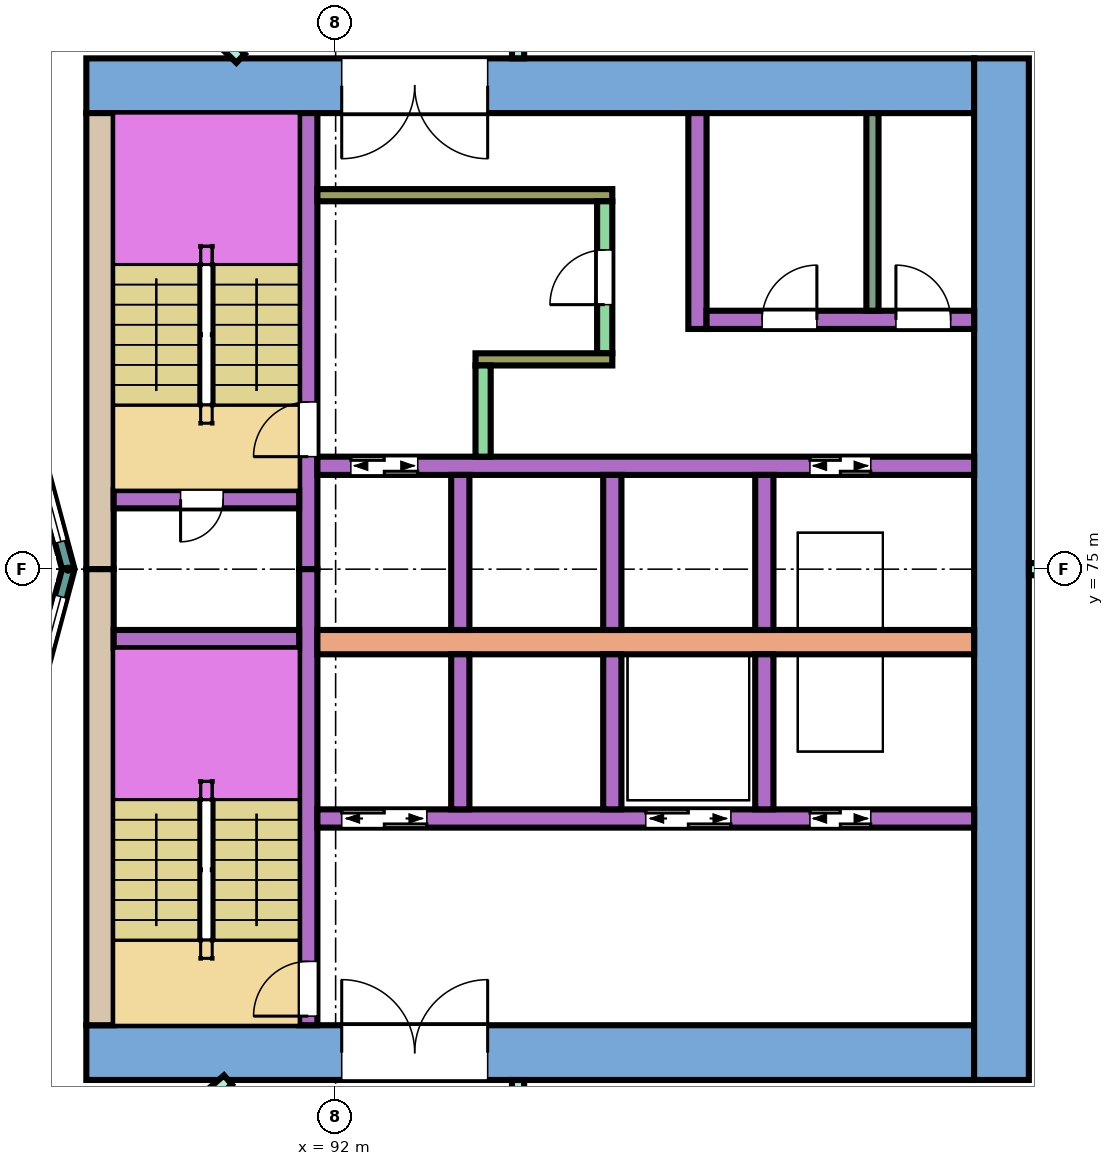
"""IFC4 building model, lengths in metres.
Left out: names, types, materials, properties, quantities, classifications, styles, units other than length and angle.
Written with IfcOpenShell. Run it as: python <this file> out.ifc"""

import sys

from ifc_helpers import new_model, si_unit, direction, frame, frame_2d, origin, place, context, subcontext, project, spatial, rectangle, extrude, element, fill, save


model = new_model("IFC4")
c1 = context("Model", 3, precision=1e-05, world=origin(), true_north=direction((0.0, 1.0)))
c2 = subcontext(c1, "Body", "Model", "MODEL_VIEW")
j1 = project(units=[si_unit("LENGTHUNIT", "METRE"), si_unit("PLANEANGLEUNIT", "RADIAN")], contexts=[c1])
p1 = place(None, origin())
s1 = spatial("IfcSite", under=j1, at=p1, CompositionType="ELEMENT")
p2 = place(p1, origin())
s2 = spatial("IfcBuilding", under=s1, at=p2, CompositionType="ELEMENT")
p3 = place(p2, frame((0.0, 0.0, 23.8)))
s3 = spatial("IfcBuildingStorey", under=s2, at=p3, CompositionType="ELEMENT", Elevation=23.8)
p4 = place(p3, frame((87.9, 82.95, 0.0), z_axis=(0.0, 0.0, 1.0), x_axis=(1.0, 0.0, 0.0)))
e1 = element("IfcWall", 1, at=p4, inside=s3, PredefinedType="SHEAR", context=c2, shape_type="SweptSolid", body=[
    extrude(rectangle(XDim=14.6, YDim=0.9, at=frame_2d((7.3, 0.0))), origin(), (0.0, 0.0, 1.0), 4.68),
])
p5 = place(p4, frame((4.2, 0.0, 0.0)))
e2 = element("IfcOpeningElement", 2, at=p5, cuts=e1, PredefinedType="OPENING", context=c2, shape_type="SweptSolid", body=[
    extrude(rectangle(XDim=2.4, YDim=2.4, at=frame_2d((1.2, 1.2))), frame((0.0, 0.46, 0.0), z_axis=(0.0, -1.0, 0.0), x_axis=(1.0, 0.0, 0.0)), (0.0, 0.0, 1.0), 0.92),
])
p6 = place(p3, frame((87.9, 67.05, 0.0), z_axis=(0.0, 0.0, 1.0), x_axis=(1.0, 0.0, 0.0)))
e3 = element("IfcWall", 3, at=p6, inside=s3, PredefinedType="SHEAR", context=c2, shape_type="SweptSolid", body=[
    extrude(rectangle(XDim=14.6, YDim=0.9, at=frame_2d((7.3, 0.0))), origin(), (0.0, 0.0, 1.0), 4.68),
])
p7 = place(p6, frame((4.2, 0.0, 0.0)))
e4 = element("IfcOpeningElement", 4, at=p7, cuts=e3, PredefinedType="OPENING", context=c2, shape_type="SweptSolid", body=[
    extrude(rectangle(XDim=2.4, YDim=2.4, at=frame_2d((1.2, 1.2))), frame((0.0, 0.46, 0.0), z_axis=(0.0, -1.0, 0.0), x_axis=(1.0, 0.0, 0.0)), (0.0, 0.0, 1.0), 0.92),
])
for number, where, z_axis, x_axis in (
    (5, (88.125, 75.0, 0.0), (0.0, 0.0, 1.0), (0.0, 1.0, 0.0)),
    (6, (88.125, 67.5, 0.0), (0.0, 0.0, 1.0), (0.0, 1.0, 0.0)),
):
    element("IfcWall", number, at=place(p3, frame(where, z_axis=z_axis, x_axis=x_axis)), inside=s3, PredefinedType="SHEAR", context=c2, shape_type="SweptSolid", body=[
        extrude(rectangle(XDim=7.5, YDim=0.45, at=frame_2d((3.75, 0.0))), origin(), (0.0, 0.0, 1.0), 4.68),
    ])
p8 = place(p3, frame((102.95, 66.6, 0.0), z_axis=(0.0, 0.0, 1.0), x_axis=(0.0, 1.0, 0.0)))
e7 = element("IfcWall", 7, at=p8, inside=s3, PredefinedType="SHEAR", context=c2, shape_type="SweptSolid", body=[
    extrude(rectangle(XDim=16.8, YDim=0.9, at=frame_2d((8.4, 0.0))), origin(), (0.0, 0.0, 1.0), 4.68),
])
p9 = place(p3, frame((91.55, 75.0, 0.0), z_axis=(0.0, 0.0, 1.0), x_axis=(0.0, 1.0, 0.0)))
e8 = element("IfcWall", 8, at=p9, inside=s3, PredefinedType="SHEAR", context=c2, shape_type="SweptSolid", body=[
    extrude(rectangle(XDim=7.5, YDim=0.3, at=frame_2d((3.75, 0.0))), origin(), (0.0, 0.0, 1.0), 4.68),
])
p10 = place(p9, frame((1.85, 0.0, 0.0)))
e9 = element("IfcOpeningElement", 9, at=p10, cuts=e8, PredefinedType="OPENING", context=c2, shape_type="SweptSolid", body=[
    extrude(rectangle(XDim=0.9, YDim=2.1, at=frame_2d((0.45, 1.05))), frame((0.0, 0.16, 0.0), z_axis=(0.0, -1.0, 0.0), x_axis=(1.0, 0.0, 0.0)), (0.0, 0.0, 1.0), 0.32),
])
p11 = place(p3, frame((91.55, 67.5, 0.0), z_axis=(0.0, 0.0, 1.0), x_axis=(0.0, 1.0, 0.0)))
e10 = element("IfcWall", 10, at=p11, inside=s3, PredefinedType="SHEAR", context=c2, shape_type="SweptSolid", body=[
    extrude(rectangle(XDim=7.5, YDim=0.3, at=frame_2d((3.75, 0.0))), origin(), (0.0, 0.0, 1.0), 4.68),
])
p12 = place(p11, frame((0.15, 0.0, 0.0)))
e11 = element("IfcOpeningElement", 11, at=p12, cuts=e10, PredefinedType="OPENING", context=c2, shape_type="SweptSolid", body=[
    extrude(rectangle(XDim=0.9, YDim=2.1, at=frame_2d((0.45, 1.05))), frame((0.0, 0.16, 0.0), z_axis=(0.0, -1.0, 0.0), x_axis=(1.0, 0.0, 0.0)), (0.0, 0.0, 1.0), 0.32),
])
p13 = place(p3, frame((88.35, 76.15, 0.0), z_axis=(0.0, 0.0, 1.0), x_axis=(1.0, 0.0, 0.0)))
e12 = element("IfcWall", 12, at=p13, inside=s3, PredefinedType="SHEAR", context=c2, shape_type="SweptSolid", body=[
    extrude(rectangle(XDim=3.05, YDim=0.3, at=frame_2d((1.525, 0.0))), origin(), (0.0, 0.0, 1.0), 4.68),
])
p14 = place(p13, frame((1.1, 0.0, 0.0)))
e13 = element("IfcOpeningElement", 13, at=p14, cuts=e12, PredefinedType="OPENING", context=c2, shape_type="SweptSolid", body=[
    extrude(rectangle(XDim=0.7, YDim=2.0, at=frame_2d((0.35, 1.0))), frame((0.0, 0.16, 0.0), z_axis=(0.0, -1.0, 0.0), x_axis=(1.0, 0.0, 0.0)), (0.0, 0.0, 1.0), 0.32),
])
p15 = place(p3, frame((88.35, 73.85, 0.0), z_axis=(0.0, 0.0, 1.0), x_axis=(1.0, 0.0, 0.0)))
e14 = element("IfcWall", 14, at=p15, inside=s3, PredefinedType="SHEAR", context=c2, shape_type="SweptSolid", body=[
    extrude(rectangle(XDim=3.05, YDim=0.3, at=frame_2d((1.525, 0.0))), origin(), (0.0, 0.0, 1.0), 4.68),
])
p16 = place(p3, frame((91.7, 76.7, 0.0), z_axis=(0.0, 0.0, 1.0), x_axis=(1.0, 0.0, 0.0)))
e15 = element("IfcWall", 15, at=p16, inside=s3, PredefinedType="SHEAR", context=c2, shape_type="SweptSolid", body=[
    extrude(rectangle(XDim=10.8, YDim=0.3, at=frame_2d((5.4, 0.0))), origin(), (0.0, 0.0, 1.0), 4.68),
])
p17 = place(p16, frame((0.55, 0.0, 0.0)))
e16 = element("IfcOpeningElement", 16, at=p17, cuts=e15, PredefinedType="OPENING", context=c2, shape_type="SweptSolid", body=[
    extrude(rectangle(XDim=1.1, YDim=2.1, at=frame_2d((0.55, 1.05))), frame((0.0, 0.16, 0.0), z_axis=(0.0, -1.0, 0.0), x_axis=(1.0, 0.0, 0.0)), (0.0, 0.0, 1.0), 0.32),
])
p18 = place(p16, frame((8.1, 0.0, 0.0)))
e17 = element("IfcOpeningElement", 17, at=p18, cuts=e15, PredefinedType="OPENING", context=c2, shape_type="SweptSolid", body=[
    extrude(rectangle(XDim=1.0, YDim=2.1, at=frame_2d((0.5, 1.05))), frame((0.0, 0.16, 0.0), z_axis=(0.0, -1.0, 0.0), x_axis=(1.0, 0.0, 0.0)), (0.0, 0.0, 1.0), 0.32),
])
p19 = place(p3, frame((91.7, 73.8, 0.0), z_axis=(0.0, 0.0, 1.0), x_axis=(1.0, 0.0, 0.0)))
e18 = element("IfcWall", 18, at=p19, inside=s3, PredefinedType="SHEAR", context=c2, shape_type="SweptSolid", body=[
    extrude(rectangle(XDim=10.8, YDim=0.4, at=frame_2d((5.4, 0.0))), origin(), (0.0, 0.0, 1.0), 4.68),
])
p20 = place(p3, frame((91.7, 70.9, 0.0), z_axis=(0.0, 0.0, 1.0), x_axis=(1.0, 0.0, 0.0)))
e19 = element("IfcWall", 19, at=p20, inside=s3, PredefinedType="SHEAR", context=c2, shape_type="SweptSolid", body=[
    extrude(rectangle(XDim=10.8, YDim=0.3, at=frame_2d((5.4, 0.0))), origin(), (0.0, 0.0, 1.0), 4.68),
])
p21 = place(p20, frame((0.4, 0.0, 0.0)))
e20 = element("IfcOpeningElement", 20, at=p21, cuts=e19, PredefinedType="OPENING", context=c2, shape_type="SweptSolid", body=[
    extrude(rectangle(XDim=1.4, YDim=2.1, at=frame_2d((0.7, 1.05))), frame((0.0, 0.16, 0.0), z_axis=(0.0, -1.0, 0.0), x_axis=(1.0, 0.0, 0.0)), (0.0, 0.0, 1.0), 0.32),
])
p22 = place(p20, frame((5.4, 0.0, 0.0)))
e21 = element("IfcOpeningElement", 21, at=p22, cuts=e19, PredefinedType="OPENING", context=c2, shape_type="SweptSolid", body=[
    extrude(rectangle(XDim=1.4, YDim=2.1, at=frame_2d((0.7, 1.05))), frame((0.0, 0.16, 0.0), z_axis=(0.0, -1.0, 0.0), x_axis=(1.0, 0.0, 0.0)), (0.0, 0.0, 1.0), 0.32),
])
p23 = place(p20, frame((8.1, 0.0, 0.0)))
e22 = element("IfcOpeningElement", 22, at=p23, cuts=e19, PredefinedType="OPENING", context=c2, shape_type="SweptSolid", body=[
    extrude(rectangle(XDim=1.0, YDim=2.1, at=frame_2d((0.5, 1.05))), frame((0.0, 0.16, 0.0), z_axis=(0.0, -1.0, 0.0), x_axis=(1.0, 0.0, 0.0)), (0.0, 0.0, 1.0), 0.32),
])
for number, where, z_axis, x_axis in (
    (23, (94.05, 74.0, 0.0), (0.0, 0.0, 1.0), (0.0, 1.0, 0.0)),
    (24, (96.55, 74.0, 0.0), (0.0, 0.0, 1.0), (0.0, 1.0, 0.0)),
    (25, (99.05, 74.0, 0.0), (0.0, 0.0, 1.0), (0.0, 1.0, 0.0)),
    (26, (94.05, 71.05, 0.0), (0.0, 0.0, 1.0), (0.0, 1.0, 0.0)),
    (27, (96.55, 71.05, 0.0), (0.0, 0.0, 1.0), (0.0, 1.0, 0.0)),
    (28, (99.05, 71.05, 0.0), (0.0, 0.0, 1.0), (0.0, 1.0, 0.0)),
):
    element("IfcWall", number, at=place(p3, frame(where, z_axis=z_axis, x_axis=x_axis)), inside=s3, PredefinedType="SHEAR", context=c2, shape_type="SweptSolid", body=[
        extrude(rectangle(XDim=2.55, YDim=0.3, at=frame_2d((1.275, 0.0))), origin(), (0.0, 0.0, 1.0), 4.68),
    ])
p24 = place(p3, frame((91.7, 81.15, 0.0), z_axis=(0.0, 0.0, 1.0), x_axis=(1.0, 0.0, 0.0)))
e29 = element("IfcWall", 29, at=p24, inside=s3, PredefinedType="SHEAR", context=c2, shape_type="SweptSolid", body=[
    extrude(rectangle(XDim=4.85, YDim=0.2, at=frame_2d((2.425, 0.0))), origin(), (0.0, 0.0, 1.0), 4.68),
])
p25 = place(p3, frame((96.425, 78.55, 0.0), z_axis=(0.0, 0.0, 1.0), x_axis=(0.0, 1.0, 0.0)))
e30 = element("IfcWall", 30, at=p25, inside=s3, PredefinedType="SHEAR", context=c2, shape_type="SweptSolid", body=[
    extrude(rectangle(XDim=2.5, YDim=0.25, at=frame_2d((1.25, 0.0))), origin(), (0.0, 0.0, 1.0), 4.68),
])
p26 = place(p25, frame((0.8, 0.0, 0.0)))
e31 = element("IfcOpeningElement", 31, at=p26, cuts=e30, PredefinedType="OPENING", context=c2, shape_type="SweptSolid", body=[
    extrude(rectangle(XDim=0.9, YDim=2.1, at=frame_2d((0.45, 1.05))), frame((0.0, 0.135, 0.0), z_axis=(0.0, -1.0, 0.0), x_axis=(1.0, 0.0, 0.0)), (0.0, 0.0, 1.0), 0.27),
])
p27 = place(p3, frame((94.3, 78.45, 0.0), z_axis=(0.0, 0.0, 1.0), x_axis=(1.0, 0.0, 0.0)))
e32 = element("IfcWall", 32, at=p27, inside=s3, PredefinedType="SHEAR", context=c2, shape_type="SweptSolid", body=[
    extrude(rectangle(XDim=2.25, YDim=0.2, at=frame_2d((1.125, 0.0))), origin(), (0.0, 0.0, 1.0), 4.68),
])
p28 = place(p3, frame((94.425, 76.85, 0.0), z_axis=(0.0, 0.0, 1.0), x_axis=(0.0, 1.0, 0.0)))
e33 = element("IfcWall", 33, at=p28, inside=s3, PredefinedType="SHEAR", context=c2, shape_type="SweptSolid", body=[
    extrude(rectangle(XDim=1.5, YDim=0.25, at=frame_2d((0.75, 0.0))), origin(), (0.0, 0.0, 1.0), 4.68),
])
p29 = place(p3, frame((97.95, 78.95, 0.0), z_axis=(0.0, 0.0, 1.0), x_axis=(0.0, 1.0, 0.0)))
e34 = element("IfcWall", 34, at=p29, inside=s3, PredefinedType="SHEAR", context=c2, shape_type="SweptSolid", body=[
    extrude(rectangle(XDim=3.55, YDim=0.3, at=frame_2d((1.775, 0.0))), origin(), (0.0, 0.0, 1.0), 4.68),
])
p30 = place(p3, frame((98.1, 79.1, 0.0), z_axis=(0.0, 0.0, 1.0), x_axis=(1.0, 0.0, 0.0)))
e35 = element("IfcWall", 35, at=p30, inside=s3, PredefinedType="SHEAR", context=c2, shape_type="SweptSolid", body=[
    extrude(rectangle(XDim=4.4, YDim=0.3, at=frame_2d((2.2, 0.0))), origin(), (0.0, 0.0, 1.0), 4.68),
])
p31 = place(p30, frame((0.914, 0.0, 0.0)))
e36 = element("IfcOpeningElement", 36, at=p31, cuts=e35, PredefinedType="OPENING", context=c2, shape_type="SweptSolid", body=[
    extrude(rectangle(XDim=0.9, YDim=2.1, at=frame_2d((0.45, 1.05))), frame((0.0, 0.16, 0.0), z_axis=(0.0, -1.0, 0.0), x_axis=(1.0, 0.0, 0.0)), (0.0, 0.0, 1.0), 0.32),
])
p32 = place(p30, frame((3.114, 0.0, 0.0)))
e37 = element("IfcOpeningElement", 37, at=p32, cuts=e35, PredefinedType="OPENING", context=c2, shape_type="SweptSolid", body=[
    extrude(rectangle(XDim=0.9, YDim=2.1, at=frame_2d((0.45, 1.05))), frame((0.0, 0.16, 0.0), z_axis=(0.0, -1.0, 0.0), x_axis=(1.0, 0.0, 0.0)), (0.0, 0.0, 1.0), 0.32),
])
p33 = place(p3, frame((87.604, 75.0, 0.0), z_axis=(0.0, 0.0, 1.0), x_axis=(-0.258789828301, 0.965933654434, 0.0)))
e38 = element("IfcWall", 38, at=p33, inside=s3, PredefinedType="NOTDEFINED", context=c2, shape_type="SweptSolid", body=[
    extrude(rectangle(XDim=3.936, YDim=0.2, at=frame_2d((1.968, 0.0))), origin(), (0.0, 0.0, 1.0), 5.0),
])
p34 = place(p33, frame((0.468, 0.0, 0.9)))
e39 = element("IfcOpeningElement", 39, at=p34, cuts=e38, PredefinedType="OPENING", context=c2, shape_type="SweptSolid", body=[
    extrude(rectangle(XDim=3.0, YDim=2.3, at=frame_2d((1.5, 1.15))), frame((0.0, 0.11, 0.0), z_axis=(0.0, -1.0, 0.0), x_axis=(1.0, 0.0, 0.0)), (0.0, 0.0, 1.0), 0.22),
])
p35 = place(p3, frame((86.585, 71.198, 0.0), z_axis=(0.0, 0.0, 1.0), x_axis=(0.258789828301, 0.965933654434, 0.0)))
e40 = element("IfcWall", 40, at=p35, inside=s3, PredefinedType="NOTDEFINED", context=c2, shape_type="SweptSolid", body=[
    extrude(rectangle(XDim=3.936, YDim=0.2, at=frame_2d((1.968, 0.0))), origin(), (0.0, 0.0, 1.0), 5.0),
])
p36 = place(p35, frame((0.468, 0.0, 0.9)))
e41 = element("IfcOpeningElement", 41, at=p36, cuts=e40, PredefinedType="OPENING", context=c2, shape_type="SweptSolid", body=[
    extrude(rectangle(XDim=3.0, YDim=2.3, at=frame_2d((1.5, 1.15))), frame((0.0, 0.11, 0.0), z_axis=(0.0, -1.0, 0.0), x_axis=(1.0, 0.0, 0.0)), (0.0, 0.0, 1.0), 0.22),
])
p37 = place(p3, frame((86.685, 63.551, 0.0), z_axis=(0.0, 0.0, 1.0), x_axis=(0.758049900748, 0.652196556244, 0.0)))
e42 = element("IfcWall", 42, at=p37, inside=s3, PredefinedType="PARTITIONING", context=c2, shape_type="SweptSolid", body=[
    extrude(rectangle(XDim=4.675, YDim=0.2, at=frame_2d((2.337, 0.0))), origin(), (0.0, 0.0, 1.0), 4.55),
])
p38 = place(p37, frame((1.887, 0.0, 0.0)))
e43 = element("IfcOpeningElement", 43, at=p38, cuts=e42, PredefinedType="OPENING", context=c2, shape_type="SweptSolid", body=[
    extrude(rectangle(XDim=0.9, YDim=2.1, at=frame_2d((0.45, 1.05))), frame((0.0, 0.11, 0.0), z_axis=(0.0, -1.0, 0.0), x_axis=(1.0, 0.0, 0.0)), (0.0, 0.0, 1.0), 0.22),
])
p39 = place(p3, frame((86.861, 86.852, 0.0), z_axis=(0.0, 0.0, 1.0), x_axis=(0.719448855188, -0.694545423114, 0.0)))
e44 = element("IfcWall", 44, at=p39, inside=s3, PredefinedType="PARTITIONING", context=c2, shape_type="SweptSolid", body=[
    extrude(rectangle(XDim=4.97, YDim=0.2, at=frame_2d((2.485, 0.0))), origin(), (0.0, 0.0, 1.0), 4.55),
])
p40 = place(p39, frame((2.035, 0.0, 0.0)))
e45 = element("IfcOpeningElement", 45, at=p40, cuts=e44, PredefinedType="OPENING", context=c2, shape_type="SweptSolid", body=[
    extrude(rectangle(XDim=0.9, YDim=2.1, at=frame_2d((0.45, 1.05))), frame((0.0, 0.11, 0.0), z_axis=(0.0, -1.0, 0.0), x_axis=(1.0, 0.0, 0.0)), (0.0, 0.0, 1.0), 0.22),
])
for number, where, z_axis, x_axis in (
    (46, (95.0, 65.1, 0.0), (0.0, 0.0, 1.0), (0.0, 1.0, 0.0)),
    (47, (95.0, 83.401, 0.0), (0.0, 0.0, 1.0), (0.0, 1.0, 0.0)),
):
    element("IfcWall", number, at=place(p3, frame(where, z_axis=z_axis, x_axis=x_axis)), inside=s3, PredefinedType="PARTITIONING", context=c2, shape_type="SweptSolid", body=[
        extrude(rectangle(XDim=1.499, YDim=0.2, at=frame_2d((0.75, 0.0))), origin(), (0.0, 0.0, 1.0), 4.55),
    ])
p41 = place(p3, frame((103.401, 75.0, 0.0), z_axis=(0.0, 0.0, 1.0), x_axis=(1.0, 0.0, 0.0)))
e48 = element("IfcWall", 48, at=p41, inside=s3, PredefinedType="PARTITIONING", context=c2, shape_type="SweptSolid", body=[
    extrude(rectangle(XDim=5.896, YDim=0.2, at=frame_2d((2.948, 0.0))), origin(), (0.0, 0.0, 1.0), 4.55),
])
p42 = place(p3, frame((100.828, 79.25, 0.0), z_axis=(0.0, 0.0, 1.0), x_axis=(0.0, 1.0, 0.0)))
e49 = element("IfcWall", 49, at=p42, inside=s3, PredefinedType="PARTITIONING", context=c2, shape_type="SweptSolid", body=[
    extrude(rectangle(XDim=3.25, YDim=0.2, at=frame_2d((1.625, 0.0))), origin(), (0.0, 0.0, 1.0), 4.68),
])
p43 = place(p34, origin())
e50 = element("IfcWindow", 50, at=p43, inside=s3, PartitioningType="SINGLE_PANEL", PredefinedType="WINDOW", context=c2, shape_type="SweptSolid", body=[
    extrude(rectangle(XDim=3.0, YDim=2.3, at=frame_2d((1.5, 1.15))), frame((0.0, 0.03, 0.0), z_axis=(0.0, -1.0, 0.0), x_axis=(1.0, 0.0, 0.0)), (0.0, 0.0, 1.0), 0.06),
])
fill(e39, e50)
p44 = place(p36, origin())
e51 = element("IfcWindow", 51, at=p44, inside=s3, PartitioningType="SINGLE_PANEL", PredefinedType="WINDOW", context=c2, shape_type="SweptSolid", body=[
    extrude(rectangle(XDim=3.0, YDim=2.3, at=frame_2d((1.5, 1.15))), frame((0.0, 0.03, 0.0), z_axis=(0.0, -1.0, 0.0), x_axis=(1.0, 0.0, 0.0)), (0.0, 0.0, 1.0), 0.06),
])
fill(e41, e51)
p45 = place(p14, frame((0.7, 0.0, 0.0), z_axis=(0.0, 0.0, 1.0), x_axis=(-1.0, 0.0, 0.0)))
e52 = element("IfcDoor", 52, at=p45, inside=s3, OperationType="SINGLE_SWING_RIGHT", PredefinedType="DOOR", context=c2, shape_type="SweptSolid", body=[
    extrude(rectangle(XDim=0.7, YDim=2.0, at=frame_2d((0.35, 1.0))), frame((0.0, 0.025, 0.0), z_axis=(0.0, -1.0, 0.0), x_axis=(1.0, 0.0, 0.0)), (0.0, 0.0, 1.0), 0.05),
])
fill(e13, e52)
p46 = place(p10, origin())
e53 = element("IfcDoor", 53, at=p46, inside=s3, OperationType="SINGLE_SWING_LEFT", PredefinedType="DOOR", context=c2, shape_type="SweptSolid", body=[
    extrude(rectangle(XDim=0.9, YDim=2.1, at=frame_2d((0.45, 1.05))), frame((0.0, 0.025, 0.0), z_axis=(0.0, -1.0, 0.0), x_axis=(1.0, 0.0, 0.0)), (0.0, 0.0, 1.0), 0.05),
])
fill(e9, e53)
p47 = place(p12, origin())
e54 = element("IfcDoor", 54, at=p47, inside=s3, OperationType="SINGLE_SWING_LEFT", PredefinedType="DOOR", context=c2, shape_type="SweptSolid", body=[
    extrude(rectangle(XDim=0.9, YDim=2.1, at=frame_2d((0.45, 1.05))), frame((0.0, 0.025, 0.0), z_axis=(0.0, -1.0, 0.0), x_axis=(1.0, 0.0, 0.0)), (0.0, 0.0, 1.0), 0.05),
])
fill(e11, e54)
p48 = place(p17, origin())
e55 = element("IfcDoor", 55, at=p48, inside=s3, OperationType="DOUBLE_DOOR_SLIDING", PredefinedType="DOOR", context=c2, shape_type="SweptSolid", body=[
    extrude(rectangle(XDim=1.1, YDim=2.1, at=frame_2d((0.55, 1.05))), frame((0.0, 0.025, 0.0), z_axis=(0.0, -1.0, 0.0), x_axis=(1.0, 0.0, 0.0)), (0.0, 0.0, 1.0), 0.05),
])
fill(e16, e55)
p49 = place(p18, origin())
e56 = element("IfcDoor", 56, at=p49, inside=s3, OperationType="DOUBLE_DOOR_SLIDING", PredefinedType="DOOR", context=c2, shape_type="SweptSolid", body=[
    extrude(rectangle(XDim=1.0, YDim=2.1, at=frame_2d((0.5, 1.05))), frame((0.0, 0.025, 0.0), z_axis=(0.0, -1.0, 0.0), x_axis=(1.0, 0.0, 0.0)), (0.0, 0.0, 1.0), 0.05),
])
fill(e17, e56)
p50 = place(p21, origin())
e57 = element("IfcDoor", 57, at=p50, inside=s3, OperationType="DOUBLE_DOOR_SLIDING", PredefinedType="DOOR", context=c2, shape_type="SweptSolid", body=[
    extrude(rectangle(XDim=1.4, YDim=2.1, at=frame_2d((0.7, 1.05))), frame((0.0, 0.025, 0.0), z_axis=(0.0, -1.0, 0.0), x_axis=(1.0, 0.0, 0.0)), (0.0, 0.0, 1.0), 0.05),
])
fill(e20, e57)
p51 = place(p22, origin())
e58 = element("IfcDoor", 58, at=p51, inside=s3, OperationType="DOUBLE_DOOR_SLIDING", PredefinedType="DOOR", context=c2, shape_type="SweptSolid", body=[
    extrude(rectangle(XDim=1.4, YDim=2.1, at=frame_2d((0.7, 1.05))), frame((0.0, 0.025, 0.0), z_axis=(0.0, -1.0, 0.0), x_axis=(1.0, 0.0, 0.0)), (0.0, 0.0, 1.0), 0.05),
])
fill(e21, e58)
p52 = place(p23, origin())
e59 = element("IfcDoor", 59, at=p52, inside=s3, OperationType="DOUBLE_DOOR_SLIDING", PredefinedType="DOOR", context=c2, shape_type="SweptSolid", body=[
    extrude(rectangle(XDim=1.0, YDim=2.1, at=frame_2d((0.5, 1.05))), frame((0.0, 0.025, 0.0), z_axis=(0.0, -1.0, 0.0), x_axis=(1.0, 0.0, 0.0)), (0.0, 0.0, 1.0), 0.05),
])
fill(e22, e59)
p53 = place(p26, origin())
e60 = element("IfcDoor", 60, at=p53, inside=s3, OperationType="SINGLE_SWING_LEFT", PredefinedType="DOOR", context=c2, shape_type="SweptSolid", body=[
    extrude(rectangle(XDim=0.9, YDim=2.1, at=frame_2d((0.45, 1.05))), frame((0.0, 0.025, 0.0), z_axis=(0.0, -1.0, 0.0), x_axis=(1.0, 0.0, 0.0)), (0.0, 0.0, 1.0), 0.05),
])
fill(e31, e60)
p54 = place(p31, origin())
e61 = element("IfcDoor", 61, at=p54, inside=s3, OperationType="SINGLE_SWING_RIGHT", PredefinedType="DOOR", context=c2, shape_type="SweptSolid", body=[
    extrude(rectangle(XDim=0.9, YDim=2.1, at=frame_2d((0.45, 1.05))), frame((0.0, 0.025, 0.0), z_axis=(0.0, -1.0, 0.0), x_axis=(1.0, 0.0, 0.0)), (0.0, 0.0, 1.0), 0.05),
])
fill(e36, e61)
p55 = place(p32, origin())
e62 = element("IfcDoor", 62, at=p55, inside=s3, OperationType="SINGLE_SWING_LEFT", PredefinedType="DOOR", context=c2, shape_type="SweptSolid", body=[
    extrude(rectangle(XDim=0.9, YDim=2.1, at=frame_2d((0.45, 1.05))), frame((0.0, 0.025, 0.0), z_axis=(0.0, -1.0, 0.0), x_axis=(1.0, 0.0, 0.0)), (0.0, 0.0, 1.0), 0.05),
])
fill(e37, e62)
p56 = place(p5, frame((2.4, 0.0, 0.0), z_axis=(0.0, 0.0, 1.0), x_axis=(-1.0, 0.0, 0.0)))
e63 = element("IfcDoor", 63, at=p56, inside=s3, OperationType="DOUBLE_DOOR_SINGLE_SWING", PredefinedType="DOOR", context=c2, shape_type="SweptSolid", body=[
    extrude(rectangle(XDim=2.4, YDim=2.4, at=frame_2d((1.2, 1.2))), frame((0.0, 0.025, 0.0), z_axis=(0.0, -1.0, 0.0), x_axis=(1.0, 0.0, 0.0)), (0.0, 0.0, 1.0), 0.05),
])
fill(e2, e63)
p57 = place(p7, origin())
e64 = element("IfcDoor", 64, at=p57, inside=s3, OperationType="DOUBLE_DOOR_SINGLE_SWING", PredefinedType="DOOR", context=c2, shape_type="SweptSolid", body=[
    extrude(rectangle(XDim=2.4, YDim=2.4, at=frame_2d((1.2, 1.2))), frame((0.0, 0.025, 0.0), z_axis=(0.0, -1.0, 0.0), x_axis=(1.0, 0.0, 0.0)), (0.0, 0.0, 1.0), 0.05),
])
fill(e4, e64)
save(model, sys.argv[1])
